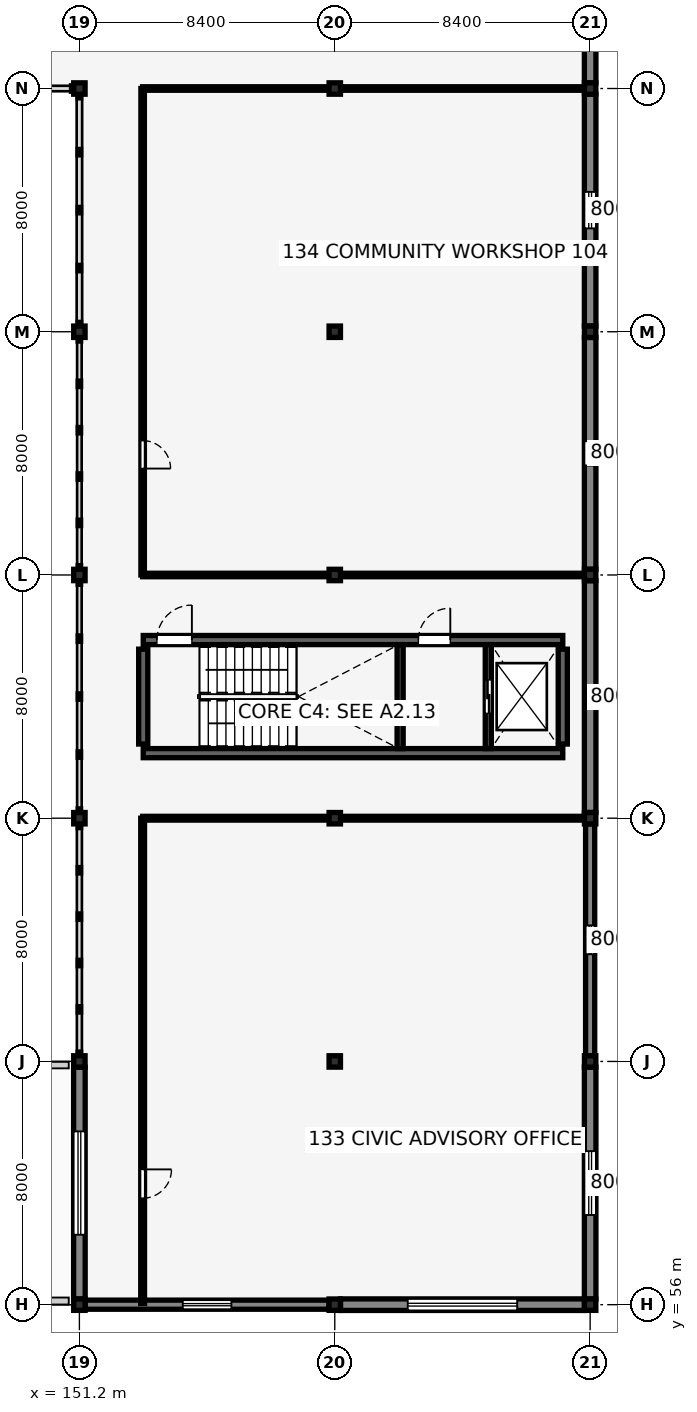
"""IFC4 building model, lengths in metres.
Left out: names, types, materials, properties, quantities, classifications, styles, units other than length and angle.
Written with IfcOpenShell. Run it as: python <this file> out.ifc"""

import sys

from ifc_helpers import new_model, si_unit, direction, frame, frame_2d, origin, origin_2d, place, context, subcontext, project, spatial, rectangle, i_section, extrude, element, fill, save


model = new_model("IFC4")
c1 = context("Model", 3, precision=1e-05, world=origin(), true_north=direction((0.0, 1.0)))
c2 = subcontext(c1, "Body", "Model", "MODEL_VIEW")
j1 = project(units=[si_unit("LENGTHUNIT", "METRE"), si_unit("PLANEANGLEUNIT", "RADIAN")], contexts=[c1])
p1 = place(None, origin())
s1 = spatial("IfcSite", under=j1, at=p1, CompositionType="ELEMENT")
p2 = place(p1, origin())
s2 = spatial("IfcBuilding", under=s1, at=p2, CompositionType="ELEMENT")
p3 = place(p2, frame((0.0, 0.0, 5.44)))
s3 = spatial("IfcBuildingStorey", under=s2, at=p3, CompositionType="ELEMENT", Elevation=5.44)
p4 = place(p3, frame((153.3, 74.14, 0.0), z_axis=(0.0, 0.0, 1.0), x_axis=(1.0, 0.0, 0.0)))
e1 = element("IfcWall", 1, at=p4, inside=s3, PredefinedType="SHEAR", context=c2, shape_type="SweptSolid", body=[
    extrude(rectangle(XDim=13.8, YDim=0.3, at=frame_2d((6.9, 0.0))), origin(), (0.0, 0.0, 1.0), 3.8),
])
p5 = place(p3, frame((153.3, 77.86, 0.0), z_axis=(0.0, 0.0, 1.0), x_axis=(1.0, 0.0, 0.0)))
e2 = element("IfcWall", 2, at=p5, inside=s3, PredefinedType="SHEAR", context=c2, shape_type="SweptSolid", body=[
    extrude(rectangle(XDim=13.8, YDim=0.3, at=frame_2d((6.9, 0.0))), origin(), (0.0, 0.0, 1.0), 3.8),
])
p6 = place(p5, frame((0.45, 0.0, 0.0), z_axis=(0.0, 0.0, 1.0), x_axis=(1.0, 0.0, 0.0)))
e3 = element("IfcOpeningElement", 3, at=p6, cuts=e2, PredefinedType="OPENING", context=c2, shape_type="SweptSolid", body=[
    extrude(rectangle(XDim=1.15, YDim=2.15, at=frame_2d((0.575, 1.075))), frame((0.0, 0.16, 0.0), z_axis=(0.0, -1.0, 0.0), x_axis=(1.0, 0.0, 0.0)), (0.0, 0.0, 1.0), 0.32),
])
p7 = place(p5, frame((9.05, 0.0, 0.0), z_axis=(0.0, 0.0, 1.0), x_axis=(1.0, 0.0, 0.0)))
e4 = element("IfcOpeningElement", 4, at=p7, cuts=e2, PredefinedType="OPENING", context=c2, shape_type="SweptSolid", body=[
    extrude(rectangle(XDim=1.05, YDim=2.15, at=frame_2d((0.525, 1.075))), frame((0.0, 0.16, 0.0), z_axis=(0.0, -1.0, 0.0), x_axis=(1.0, 0.0, 0.0)), (0.0, 0.0, 1.0), 0.32),
])
for number, where, z_axis, x_axis in (
    (5, (153.3, 74.44, 0.0), (0.0, 0.0, 1.0), (0.0, 1.0, 0.0)),
    (6, (167.1, 74.44, 0.0), (0.0, 0.0, 1.0), (0.0, 1.0, 0.0)),
):
    element("IfcWall", number, at=place(p3, frame(where, z_axis=z_axis, x_axis=x_axis)), inside=s3, PredefinedType="SHEAR", context=c2, shape_type="SweptSolid", body=[
        extrude(rectangle(XDim=3.12, YDim=0.3, at=frame_2d((1.56, 0.0))), origin(), (0.0, 0.0, 1.0), 3.8),
    ])
for number, where, z_axis, x_axis in (
    (7, (151.2, 56.0, 0.0), (0.0, 0.0, 1.0), (1.0, 0.0, 0.0)),
    (8, (151.2, 64.0, 0.0), (0.0, 0.0, 1.0), (1.0, 0.0, 0.0)),
    (9, (151.2, 72.0, 0.0), (0.0, 0.0, 1.0), (1.0, 0.0, 0.0)),
    (10, (151.2, 80.0, 0.0), (0.0, 0.0, 1.0), (1.0, 0.0, 0.0)),
    (11, (151.2, 88.0, 0.0), (0.0, 0.0, 1.0), (1.0, 0.0, 0.0)),
    (12, (151.2, 96.0, 0.0), (0.0, 0.0, 1.0), (1.0, 0.0, 0.0)),
    (13, (159.6, 56.0, 0.0), (0.0, 0.0, 1.0), (1.0, 0.0, 0.0)),
    (14, (159.6, 64.0, 0.0), (0.0, 0.0, 1.0), (1.0, 0.0, 0.0)),
    (15, (159.6, 72.0, 0.0), (0.0, 0.0, 1.0), (1.0, 0.0, 0.0)),
    (16, (159.6, 80.0, 0.0), (0.0, 0.0, 1.0), (1.0, 0.0, 0.0)),
    (17, (159.6, 88.0, 0.0), (0.0, 0.0, 1.0), (1.0, 0.0, 0.0)),
    (18, (159.6, 96.0, 0.0), (0.0, 0.0, 1.0), (1.0, 0.0, 0.0)),
    (19, (168.0, 56.0, 0.0), (0.0, 0.0, 1.0), (1.0, 0.0, 0.0)),
    (20, (168.0, 64.0, 0.0), (0.0, 0.0, 1.0), (1.0, 0.0, 0.0)),
    (21, (168.0, 72.0, 0.0), (0.0, 0.0, 1.0), (1.0, 0.0, 0.0)),
    (22, (168.0, 80.0, 0.0), (0.0, 0.0, 1.0), (1.0, 0.0, 0.0)),
    (23, (168.0, 88.0, 0.0), (0.0, 0.0, 1.0), (1.0, 0.0, 0.0)),
    (24, (168.0, 96.0, 0.0), (0.0, 0.0, 1.0), (1.0, 0.0, 0.0)),
):
    element("IfcColumn", number, at=place(p3, frame(where, z_axis=z_axis, x_axis=x_axis)), inside=s3, PredefinedType="COLUMN", context=c2, shape_type="SweptSolid", body=[
        extrude(i_section(OverallWidth=0.375, OverallDepth=0.375, WebThickness=0.017, FlangeThickness=0.027, FilletRadius=0.015, at=origin_2d()), origin(), (0.0, 0.0, 1.0), 3.8),
    ])
p8 = place(p3, frame((168.0, 96.187, 0.0), z_axis=(0.0, 0.0, 1.0), x_axis=(0.0, 1.0, 0.0)))
e25 = element("IfcWall", 25, at=p8, inside=s3, PredefinedType="SOLIDWALL", context=c2, shape_type="SweptSolid", body=[
    extrude(rectangle(XDim=7.625, YDim=0.38, at=frame_2d((3.813, 0.0))), origin(), (0.0, 0.0, 1.0), 3.442),
])
p9 = place(p8, frame((2.213, 0.0, 1.55), z_axis=(0.0, 0.0, 1.0), x_axis=(1.0, 0.0, 0.0)))
e26 = element("IfcOpeningElement", 26, at=p9, cuts=e25, PredefinedType="OPENING", context=c2, shape_type="SweptSolid", body=[
    extrude(rectangle(XDim=3.2, YDim=0.9, at=frame_2d((1.6, 0.45))), frame((0.0, 0.2, 0.0), z_axis=(0.0, -1.0, 0.0), x_axis=(1.0, 0.0, 0.0)), (0.0, 0.0, 1.0), 0.4),
])
p10 = place(p3, frame((168.0, 56.187, 0.0), z_axis=(0.0, 0.0, 1.0), x_axis=(0.0, 1.0, 0.0)))
e27 = element("IfcWall", 27, at=p10, inside=s3, PredefinedType="SOLIDWALL", context=c2, shape_type="SweptSolid", body=[
    extrude(rectangle(XDim=7.625, YDim=0.38, at=frame_2d((3.813, 0.0))), origin(), (0.0, 0.0, 1.0), 3.442),
])
p11 = place(p10, frame((2.763, 0.0, 1.55), z_axis=(0.0, 0.0, 1.0), x_axis=(1.0, 0.0, 0.0)))
e28 = element("IfcOpeningElement", 28, at=p11, cuts=e27, PredefinedType="OPENING", context=c2, shape_type="SweptSolid", body=[
    extrude(rectangle(XDim=2.1, YDim=0.8, at=frame_2d((1.05, 0.4))), frame((0.0, 0.2, 0.0), z_axis=(0.0, -1.0, 0.0), x_axis=(1.0, 0.0, 0.0)), (0.0, 0.0, 1.0), 0.4),
])
p12 = place(p3, frame((168.0, 64.187, 0.0), z_axis=(0.0, 0.0, 1.0), x_axis=(0.0, 1.0, 0.0)))
e29 = element("IfcWall", 29, at=p12, inside=s3, PredefinedType="SOLIDWALL", context=c2, shape_type="SweptSolid", body=[
    extrude(rectangle(XDim=7.625, YDim=0.3, at=frame_2d((3.813, 0.0))), origin(), (0.0, 0.0, 1.0), 3.442),
])
p13 = place(p12, frame((3.338, 0.0, 0.65), z_axis=(0.0, 0.0, 1.0), x_axis=(1.0, 0.0, 0.0)))
e30 = element("IfcOpeningElement", 30, at=p13, cuts=e29, PredefinedType="OPENING", context=c2, shape_type="SweptSolid", body=[
    extrude(rectangle(XDim=0.95, YDim=2.1, at=frame_2d((0.475, 1.05))), frame((0.0, 0.16, 0.0), z_axis=(0.0, -1.0, 0.0), x_axis=(1.0, 0.0, 0.0)), (0.0, 0.0, 1.0), 0.32),
])
p14 = place(p3, frame((168.0, 72.187, 0.0), z_axis=(0.0, 0.0, 1.0), x_axis=(0.0, 1.0, 0.0)))
e31 = element("IfcWall", 31, at=p14, inside=s3, PredefinedType="SOLIDWALL", context=c2, shape_type="SweptSolid", body=[
    extrude(rectangle(XDim=7.625, YDim=0.38, at=frame_2d((3.813, 0.0))), origin(), (0.0, 0.0, 1.0), 3.5),
])
p15 = place(p3, frame((168.0, 80.187, 0.0), z_axis=(0.0, 0.0, 1.0), x_axis=(0.0, 1.0, 0.0)))
e32 = element("IfcWall", 32, at=p15, inside=s3, PredefinedType="SOLIDWALL", context=c2, shape_type="SweptSolid", body=[
    extrude(rectangle(XDim=7.625, YDim=0.38, at=frame_2d((3.813, 0.0))), origin(), (0.0, 0.0, 1.0), 3.442),
])
p16 = place(p15, frame((3.413, 0.0, 0.65), z_axis=(0.0, 0.0, 1.0), x_axis=(1.0, 0.0, 0.0)))
e33 = element("IfcOpeningElement", 33, at=p16, cuts=e32, PredefinedType="OPENING", context=c2, shape_type="SweptSolid", body=[
    extrude(rectangle(XDim=0.8, YDim=1.85, at=frame_2d((0.4, 0.925))), frame((0.0, 0.2, 0.0), z_axis=(0.0, -1.0, 0.0), x_axis=(1.0, 0.0, 0.0)), (0.0, 0.0, 1.0), 0.4),
])
p17 = place(p3, frame((168.0, 88.187, 0.0), z_axis=(0.0, 0.0, 1.0), x_axis=(0.0, 1.0, 0.0)))
e34 = element("IfcWall", 34, at=p17, inside=s3, PredefinedType="SOLIDWALL", context=c2, shape_type="SweptSolid", body=[
    extrude(rectangle(XDim=7.625, YDim=0.38, at=frame_2d((3.813, 0.0))), origin(), (0.0, 0.0, 1.0), 3.442),
])
p18 = place(p17, frame((3.213, 0.0, 1.55), z_axis=(0.0, 0.0, 1.0), x_axis=(1.0, 0.0, 0.0)))
e35 = element("IfcOpeningElement", 35, at=p18, cuts=e34, PredefinedType="OPENING", context=c2, shape_type="SweptSolid", body=[
    extrude(rectangle(XDim=1.2, YDim=0.95, at=frame_2d((0.6, 0.475))), frame((0.0, 0.2, 0.0), z_axis=(0.0, -1.0, 0.0), x_axis=(1.0, 0.0, 0.0)), (0.0, 0.0, 1.0), 0.4),
])
p19 = place(p3, frame((151.387, 56.0, 0.0), z_axis=(0.0, 0.0, 1.0), x_axis=(1.0, 0.0, 0.0)))
e36 = element("IfcWall", 36, at=p19, inside=s3, PredefinedType="SOLIDWALL", context=c2, shape_type="SweptSolid", body=[
    extrude(rectangle(XDim=8.025, YDim=0.3, at=frame_2d((4.013, 0.0))), origin(), (0.0, 0.0, 1.0), 3.45),
])
p20 = place(p19, frame((3.213, 0.0, 0.9), z_axis=(0.0, 0.0, 1.0), x_axis=(1.0, 0.0, 0.0)))
e37 = element("IfcOpeningElement", 37, at=p20, cuts=e36, PredefinedType="OPENING", context=c2, shape_type="SweptSolid", body=[
    extrude(rectangle(XDim=1.6, YDim=1.2, at=frame_2d((0.8, 0.6))), frame((0.0, 0.16, 0.0), z_axis=(0.0, -1.0, 0.0), x_axis=(1.0, 0.0, 0.0)), (0.0, 0.0, 1.0), 0.32),
])
p21 = place(p3, frame((159.787, 56.0, 0.0), z_axis=(0.0, 0.0, 1.0), x_axis=(1.0, 0.0, 0.0)))
e38 = element("IfcWall", 38, at=p21, inside=s3, PredefinedType="SOLIDWALL", context=c2, shape_type="SweptSolid", body=[
    extrude(rectangle(XDim=8.025, YDim=0.38, at=frame_2d((4.013, 0.0))), origin(), (0.0, 0.0, 1.0), 3.45),
])
p22 = place(p21, frame((2.213, 0.0, 0.9), z_axis=(0.0, 0.0, 1.0), x_axis=(1.0, 0.0, 0.0)))
e39 = element("IfcOpeningElement", 39, at=p22, cuts=e38, PredefinedType="OPENING", context=c2, shape_type="SweptSolid", body=[
    extrude(rectangle(XDim=3.6, YDim=1.8, at=frame_2d((1.8, 0.9))), frame((0.0, 0.2, 0.0), z_axis=(0.0, -1.0, 0.0), x_axis=(1.0, 0.0, 0.0)), (0.0, 0.0, 1.0), 0.4),
])
p23 = place(p3, frame((151.2, 56.187, 0.0), z_axis=(0.0, 0.0, 1.0), x_axis=(0.0, 1.0, 0.0)))
e40 = element("IfcWall", 40, at=p23, inside=s3, PredefinedType="SOLIDWALL", context=c2, shape_type="SweptSolid", body=[
    extrude(rectangle(XDim=7.625, YDim=0.38, at=frame_2d((3.813, 0.0))), origin(), (0.0, 0.0, 1.0), 3.442),
])
p24 = place(p23, frame((2.113, 0.0, 0.9), z_axis=(0.0, 0.0, 1.0), x_axis=(1.0, 0.0, 0.0)))
e41 = element("IfcOpeningElement", 41, at=p24, cuts=e40, PredefinedType="OPENING", context=c2, shape_type="SweptSolid", body=[
    extrude(rectangle(XDim=3.4, YDim=1.7, at=frame_2d((1.7, 0.85))), frame((0.0, 0.2, 0.0), z_axis=(0.0, -1.0, 0.0), x_axis=(1.0, 0.0, 0.0)), (0.0, 0.0, 1.0), 0.4),
])
p25 = place(p3, frame((117.95, 63.88, 0.0), z_axis=(0.0, 0.0, 1.0), x_axis=(1.0, 0.0, 0.0)))
e42 = element("IfcWall", 42, at=p25, inside=s3, PredefinedType="PARAPET", context=c2, shape_type="SweptSolid", body=[
    extrude(rectangle(XDim=32.9, YDim=0.215, at=frame_2d((16.45, 0.0))), origin(), (0.0, 0.0, 1.0), 1.05),
])
p26 = place(p3, frame((150.85, 56.12, 0.0), z_axis=(0.0, 0.0, 1.0), x_axis=(-1.0, 0.0, 0.0)))
e43 = element("IfcWall", 43, at=p26, inside=s3, PredefinedType="PARAPET", context=c2, shape_type="SweptSolid", body=[
    extrude(rectangle(XDim=16.122, YDim=0.23, at=frame_2d((8.061, 0.0))), origin(), (0.0, 0.0, 1.0), 1.05),
])
p27 = place(p3, frame((161.75, 74.29, 0.0), z_axis=(0.0, 0.0, 1.0), x_axis=(0.0, 1.0, 0.0)))
e44 = element("IfcWall", 44, at=p27, inside=s3, PredefinedType="SHEAR", context=c2, shape_type="SweptSolid", body=[
    extrude(rectangle(XDim=3.42, YDim=0.2, at=frame_2d((1.71, 0.0))), origin(), (0.0, 0.0, 1.0), 3.8),
])
p28 = place(p3, frame((164.65, 74.29, 0.0), z_axis=(0.0, 0.0, 1.0), x_axis=(0.0, 1.0, 0.0)))
e45 = element("IfcWall", 45, at=p28, inside=s3, PredefinedType="SHEAR", context=c2, shape_type="SweptSolid", body=[
    extrude(rectangle(XDim=3.42, YDim=0.2, at=frame_2d((1.71, 0.0))), origin(), (0.0, 0.0, 1.0), 3.8),
])
p29 = place(p28, frame((1.16, 0.0, 0.0), z_axis=(0.0, 0.0, 1.0), x_axis=(1.0, 0.0, 0.0)))
e46 = element("IfcOpeningElement", 46, at=p29, cuts=e45, PredefinedType="OPENING", context=c2, shape_type="SweptSolid", body=[
    extrude(rectangle(XDim=1.1, YDim=2.15, at=frame_2d((0.55, 1.075))), frame((0.0, 0.11, 0.0), z_axis=(0.0, -1.0, 0.0), x_axis=(1.0, 0.0, 0.0)), (0.0, 0.0, 1.0), 0.22),
])
p30 = place(p3, frame((153.28, 56.04, 0.0), z_axis=(0.0, 0.0, 1.0), x_axis=(0.0, 1.0, 0.0)))
e47 = element("IfcWall", 47, at=p30, inside=s3, PredefinedType="PARTITIONING", context=c2, shape_type="SweptSolid", body=[
    extrude(rectangle(XDim=15.96, YDim=0.125, at=frame_2d((7.98, 0.0))), origin(), (0.0, 0.0, 1.0), 3.8),
])
p31 = place(p30, frame((4.41, 0.0, 0.0), z_axis=(0.0, 0.0, 1.0), x_axis=(-1.0, 0.0, 0.0)))
e48 = element("IfcOpeningElement", 48, at=p31, cuts=e47, PredefinedType="OPENING", context=c2, shape_type="SweptSolid", body=[
    extrude(rectangle(XDim=0.95, YDim=2.15, at=frame_2d((0.475, 1.075))), frame((0.0, 0.073, 0.0), z_axis=(0.0, -1.0, 0.0), x_axis=(1.0, 0.0, 0.0)), (0.0, 0.0, 1.0), 0.145),
])
p32 = place(p3, frame((153.28, 80.0, 0.0), z_axis=(0.0, 0.0, 1.0), x_axis=(0.0, 1.0, 0.0)))
e49 = element("IfcWall", 49, at=p32, inside=s3, PredefinedType="PARTITIONING", context=c2, shape_type="SweptSolid", body=[
    extrude(rectangle(XDim=16.0, YDim=0.115, at=frame_2d((8.0, 0.0))), origin(), (0.0, 0.0, 1.0), 3.8),
])
p33 = place(p32, frame((4.42, 0.0, 0.0), z_axis=(0.0, 0.0, 1.0), x_axis=(-1.0, 0.0, 0.0)))
e50 = element("IfcOpeningElement", 50, at=p33, cuts=e49, PredefinedType="OPENING", context=c2, shape_type="SweptSolid", body=[
    extrude(rectangle(XDim=0.92, YDim=2.12, at=frame_2d((0.46, 1.06))), frame((0.0, 0.067, 0.0), z_axis=(0.0, -1.0, 0.0), x_axis=(1.0, 0.0, 0.0)), (0.0, 0.0, 1.0), 0.135),
])
p34 = place(p3, frame((153.28, 72.0, 0.0), z_axis=(0.0, 0.0, 1.0), x_axis=(1.0, 0.0, 0.0)))
e51 = element("IfcWall", 51, at=p34, inside=s3, PredefinedType="PARTITIONING", context=c2, shape_type="SweptSolid", body=[
    extrude(rectangle(XDim=6.143, YDim=0.125, at=frame_2d((3.071, 0.0))), origin(), (0.0, 0.0, 1.0), 3.26),
])
p35 = place(p3, frame((159.777, 72.0, 0.0), z_axis=(0.0, 0.0, 1.0), x_axis=(1.0, 0.0, 0.0)))
e52 = element("IfcWall", 52, at=p35, inside=s3, PredefinedType="PARTITIONING", context=c2, shape_type="SweptSolid", body=[
    extrude(rectangle(XDim=8.045, YDim=0.125, at=frame_2d((4.023, 0.0))), origin(), (0.0, 0.0, 1.0), 3.26),
])
p36 = place(p3, frame((153.28, 80.0, 0.0), z_axis=(0.0, 0.0, 1.0), x_axis=(1.0, 0.0, 0.0)))
e53 = element("IfcWall", 53, at=p36, inside=s3, PredefinedType="PARTITIONING", context=c2, shape_type="SweptSolid", body=[
    extrude(rectangle(XDim=6.143, YDim=0.115, at=frame_2d((3.071, 0.0))), origin(), (0.0, 0.0, 1.0), 3.26),
])
p37 = place(p3, frame((159.777, 80.0, 0.0), z_axis=(0.0, 0.0, 1.0), x_axis=(1.0, 0.0, 0.0)))
e54 = element("IfcWall", 54, at=p37, inside=s3, PredefinedType="PARTITIONING", context=c2, shape_type="SweptSolid", body=[
    extrude(rectangle(XDim=8.045, YDim=0.115, at=frame_2d((4.023, 0.0))), origin(), (0.0, 0.0, 1.0), 3.26),
])
p38 = place(p3, frame((153.28, 96.0, 0.0), z_axis=(0.0, 0.0, 1.0), x_axis=(1.0, 0.0, 0.0)))
e55 = element("IfcWall", 55, at=p38, inside=s3, PredefinedType="PARTITIONING", context=c2, shape_type="SweptSolid", body=[
    extrude(rectangle(XDim=6.143, YDim=0.115, at=frame_2d((3.071, 0.0))), origin(), (0.0, 0.0, 1.0), 3.26),
])
p39 = place(p3, frame((159.777, 96.0, 0.0), z_axis=(0.0, 0.0, 1.0), x_axis=(1.0, 0.0, 0.0)))
e56 = element("IfcWall", 56, at=p39, inside=s3, PredefinedType="PARTITIONING", context=c2, shape_type="SweptSolid", body=[
    extrude(rectangle(XDim=8.045, YDim=0.115, at=frame_2d((4.023, 0.0))), origin(), (0.0, 0.0, 1.0), 3.26),
])
p40 = place(p11, origin())
e57 = element("IfcWindow", 57, at=p40, inside=s3, PartitioningType="DOUBLE_PANEL_HORIZONTAL", PredefinedType="WINDOW", context=c2, shape_type="SweptSolid", body=[
    extrude(rectangle(XDim=2.1, YDim=0.8, at=frame_2d((1.05, 0.4))), frame((0.0, 0.03, 0.0), z_axis=(0.0, -1.0, 0.0), x_axis=(1.0, 0.0, 0.0)), (0.0, 0.0, 1.0), 0.06),
])
fill(e28, e57)
p41 = place(p13, origin())
e58 = element("IfcWindow", 58, at=p41, inside=s3, PartitioningType="SINGLE_PANEL", PredefinedType="WINDOW", context=c2, shape_type="SweptSolid", body=[
    extrude(rectangle(XDim=0.95, YDim=2.1, at=frame_2d((0.475, 1.05))), frame((0.0, 0.03, 0.0), z_axis=(0.0, -1.0, 0.0), x_axis=(1.0, 0.0, 0.0)), (0.0, 0.0, 1.0), 0.06),
])
fill(e30, e58)
p42 = place(p16, origin())
e59 = element("IfcWindow", 59, at=p42, inside=s3, PartitioningType="SINGLE_PANEL", PredefinedType="WINDOW", context=c2, shape_type="SweptSolid", body=[
    extrude(rectangle(XDim=0.8, YDim=1.85, at=frame_2d((0.4, 0.925))), frame((0.0, 0.03, 0.0), z_axis=(0.0, -1.0, 0.0), x_axis=(1.0, 0.0, 0.0)), (0.0, 0.0, 1.0), 0.06),
])
fill(e33, e59)
p43 = place(p18, origin())
e60 = element("IfcWindow", 60, at=p43, inside=s3, PartitioningType="SINGLE_PANEL", PredefinedType="WINDOW", context=c2, shape_type="SweptSolid", body=[
    extrude(rectangle(XDim=1.2, YDim=0.95, at=frame_2d((0.6, 0.475))), frame((0.0, 0.03, 0.0), z_axis=(0.0, -1.0, 0.0), x_axis=(1.0, 0.0, 0.0)), (0.0, 0.0, 1.0), 0.06),
])
fill(e35, e60)
p44 = place(p20, origin())
e61 = element("IfcWindow", 61, at=p44, inside=s3, PartitioningType="DOUBLE_PANEL_VERTICAL", PredefinedType="WINDOW", context=c2, shape_type="SweptSolid", body=[
    extrude(rectangle(XDim=1.6, YDim=1.2, at=frame_2d((0.8, 0.6))), frame((0.0, 0.03, 0.0), z_axis=(0.0, -1.0, 0.0), x_axis=(1.0, 0.0, 0.0)), (0.0, 0.0, 1.0), 0.06),
])
fill(e37, e61)
p45 = place(p22, origin())
e62 = element("IfcWindow", 62, at=p45, inside=s3, PartitioningType="TRIPLE_PANEL_VERTICAL", PredefinedType="WINDOW", context=c2, shape_type="SweptSolid", body=[
    extrude(rectangle(XDim=3.6, YDim=1.8, at=frame_2d((1.8, 0.9))), frame((0.0, 0.03, 0.0), z_axis=(0.0, -1.0, 0.0), x_axis=(1.0, 0.0, 0.0)), (0.0, 0.0, 1.0), 0.06),
])
fill(e39, e62)
p46 = place(p24, origin())
e63 = element("IfcWindow", 63, at=p46, inside=s3, PartitioningType="TRIPLE_PANEL_VERTICAL", PredefinedType="WINDOW", context=c2, shape_type="SweptSolid", body=[
    extrude(rectangle(XDim=3.4, YDim=1.7, at=frame_2d((1.7, 0.85))), frame((0.0, 0.03, 0.0), z_axis=(0.0, -1.0, 0.0), x_axis=(1.0, 0.0, 0.0)), (0.0, 0.0, 1.0), 0.06),
])
fill(e41, e63)
p47 = place(p6, origin())
e64 = element("IfcDoor", 64, at=p47, inside=s3, OperationType="SINGLE_SWING_RIGHT", PredefinedType="DOOR", context=c2, shape_type="SweptSolid", body=[
    extrude(rectangle(XDim=1.15, YDim=2.15, at=frame_2d((0.575, 1.075))), frame((0.0, 0.025, 0.0), z_axis=(0.0, -1.0, 0.0), x_axis=(1.0, 0.0, 0.0)), (0.0, 0.0, 1.0), 0.05),
])
fill(e3, e64)
p48 = place(p7, origin())
e65 = element("IfcDoor", 65, at=p48, inside=s3, OperationType="SINGLE_SWING_RIGHT", PredefinedType="DOOR", context=c2, shape_type="SweptSolid", body=[
    extrude(rectangle(XDim=1.05, YDim=2.15, at=frame_2d((0.525, 1.075))), frame((0.0, 0.025, 0.0), z_axis=(0.0, -1.0, 0.0), x_axis=(1.0, 0.0, 0.0)), (0.0, 0.0, 1.0), 0.05),
])
fill(e4, e65)
p49 = place(p29, origin())
e66 = element("IfcDoor", 66, at=p49, inside=s3, OperationType="DOUBLE_DOOR_SLIDING", PredefinedType="DOOR", context=c2, shape_type="SweptSolid", body=[
    extrude(rectangle(XDim=1.1, YDim=2.15, at=frame_2d((0.55, 1.075))), frame((0.0, 0.025, 0.0), z_axis=(0.0, -1.0, 0.0), x_axis=(1.0, 0.0, 0.0)), (0.0, 0.0, 1.0), 0.05),
])
fill(e46, e66)
p50 = place(p31, origin())
e67 = element("IfcDoor", 67, at=p50, inside=s3, OperationType="SINGLE_SWING_LEFT", PredefinedType="DOOR", context=c2, shape_type="SweptSolid", body=[
    extrude(rectangle(XDim=0.95, YDim=2.15, at=frame_2d((0.475, 1.075))), frame((0.0, 0.025, 0.0), z_axis=(0.0, -1.0, 0.0), x_axis=(1.0, 0.0, 0.0)), (0.0, 0.0, 1.0), 0.05),
])
fill(e48, e67)
p51 = place(p33, origin())
e68 = element("IfcDoor", 68, at=p51, inside=s3, OperationType="SINGLE_SWING_RIGHT", PredefinedType="DOOR", context=c2, shape_type="SweptSolid", body=[
    extrude(rectangle(XDim=0.92, YDim=2.12, at=frame_2d((0.46, 1.06))), frame((0.0, 0.025, 0.0), z_axis=(0.0, -1.0, 0.0), x_axis=(1.0, 0.0, 0.0)), (0.0, 0.0, 1.0), 0.05),
])
fill(e50, e68)
save(model, sys.argv[1])
